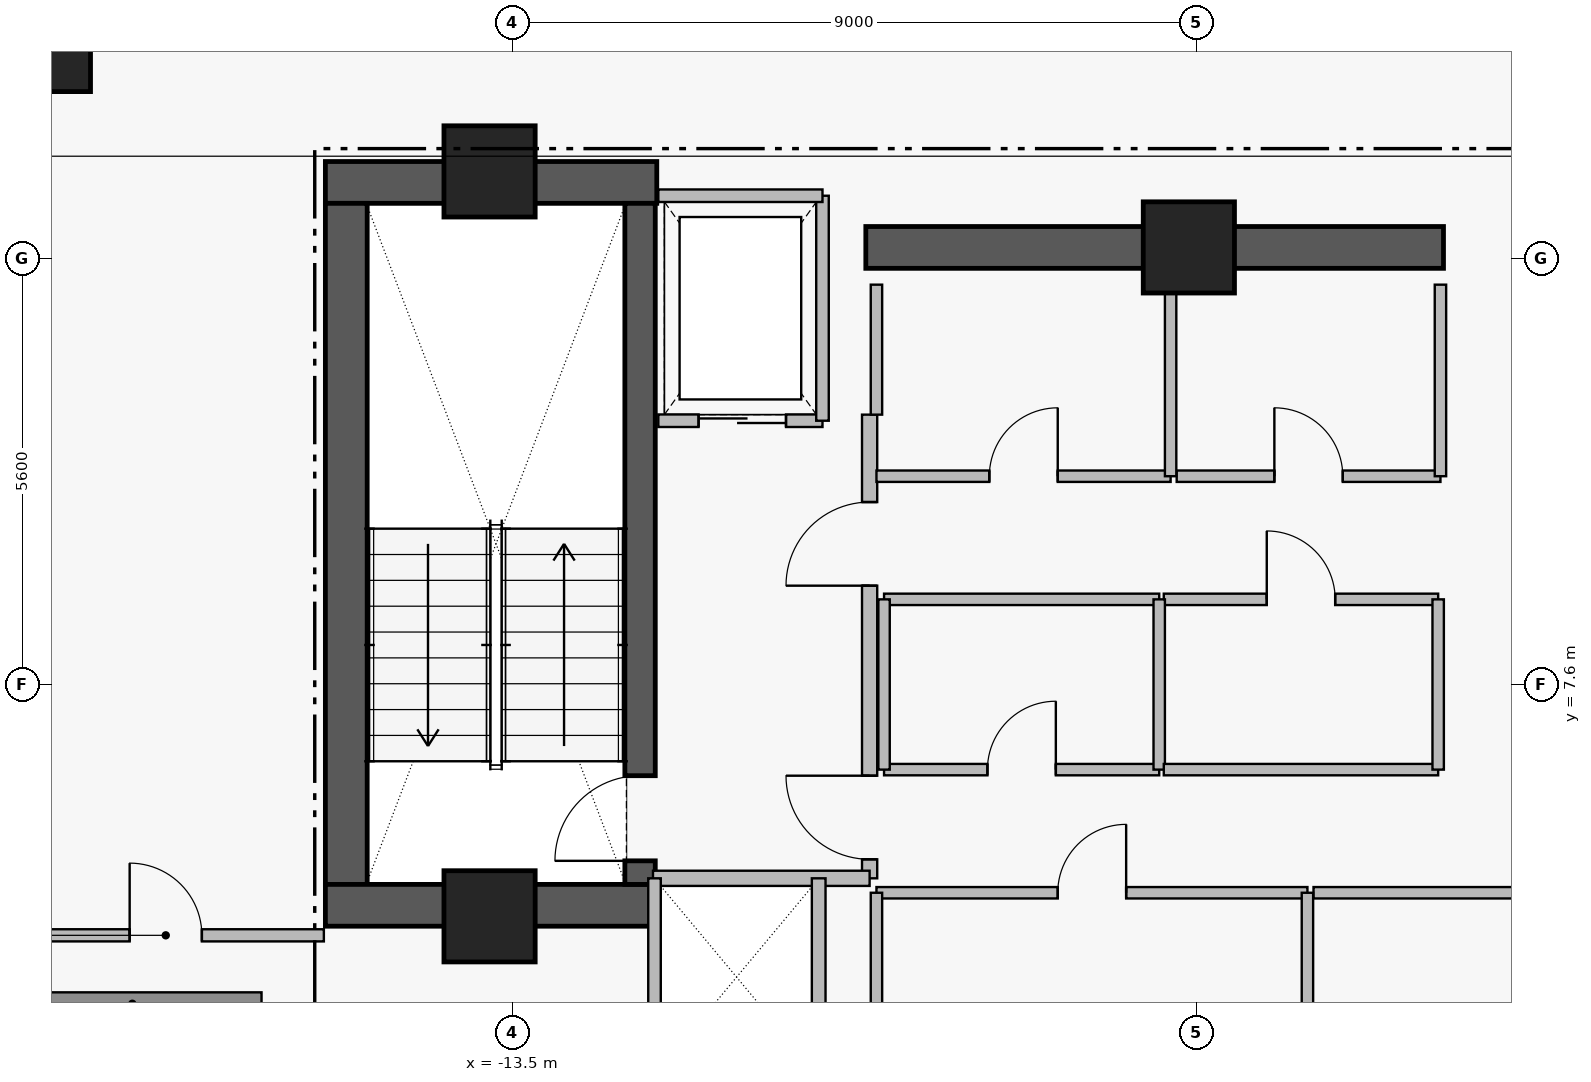
"""IFC4 building model, lengths in metres.
Left out: names, types, materials, properties, quantities, classifications, styles, units other than length and angle.
Written with IfcOpenShell. Run it as: python <this file> out.ifc"""

import sys

from ifc_helpers import new_model, si_unit, direction, frame, frame_2d, origin, origin_2d, place, context, subcontext, project, spatial, rectangle, extrude, element, fill, save


model = new_model("IFC4")
c1 = context("Model", 3, precision=1e-05, world=origin(), true_north=direction((0.0, 1.0)))
c2 = subcontext(c1, "Body", "Model", "MODEL_VIEW")
j1 = project(units=[si_unit("LENGTHUNIT", "METRE"), si_unit("PLANEANGLEUNIT", "RADIAN")], contexts=[c1])
p1 = place(None, origin())
s1 = spatial("IfcSite", under=j1, at=p1, CompositionType="ELEMENT")
p2 = place(p1, origin())
s2 = spatial("IfcBuilding", under=s1, at=p2, CompositionType="ELEMENT")
p3 = place(p2, frame((0.0, 0.0, 250.75)))
s3 = spatial("IfcBuildingStorey", under=s2, at=p3, CompositionType="ELEMENT", Elevation=250.75)
p4 = place(p3, frame((-15.96, 14.205, 0.0), z_axis=(0.0, 0.0, 1.0), x_axis=(1.0, 0.0, 0.0)))
e1 = element("IfcWall", 1, at=p4, inside=s3, PredefinedType="SHEAR", context=c2, shape_type="SweptSolid", body=[
    extrude(rectangle(XDim=4.36, YDim=0.55, at=frame_2d((2.18, 0.0))), origin(), (0.0, 0.0, 1.0), 3.51),
])
p5 = place(p3, frame((-15.685, 4.97, 0.0), z_axis=(0.0, 0.0, 1.0), x_axis=(0.0, 1.0, 0.0)))
e2 = element("IfcWall", 2, at=p5, inside=s3, PredefinedType="SHEAR", context=c2, shape_type="SweptSolid", body=[
    extrude(rectangle(XDim=8.96, YDim=0.55, at=frame_2d((4.48, 0.0))), origin(), (0.0, 0.0, 1.0), 3.51),
])
p6 = place(p3, frame((-15.96, 4.695, 0.0), z_axis=(0.0, 0.0, 1.0), x_axis=(1.0, 0.0, 0.0)))
e3 = element("IfcWall", 3, at=p6, inside=s3, PredefinedType="SHEAR", context=c2, shape_type="SweptSolid", body=[
    extrude(rectangle(XDim=4.36, YDim=0.55, at=frame_2d((2.18, 0.0))), origin(), (0.0, 0.0, 1.0), 3.51),
])
p7 = place(p3, frame((-8.85, 13.35, 0.0), z_axis=(0.0, 0.0, 1.0), x_axis=(1.0, 0.0, 0.0)))
e4 = element("IfcWall", 4, at=p7, inside=s3, PredefinedType="SHEAR", context=c2, shape_type="SweptSolid", body=[
    extrude(rectangle(XDim=7.6, YDim=0.55, at=frame_2d((3.8, 0.0))), origin(), (0.0, 0.0, 1.0), 3.48),
])
p8 = place(p3, frame((-11.82, 4.97, 0.0), z_axis=(0.0, 0.0, 1.0), x_axis=(0.0, 1.0, 0.0)))
e5 = element("IfcWall", 5, at=p8, inside=s3, PredefinedType="SHEAR", context=c2, shape_type="SweptSolid", body=[
    extrude(rectangle(XDim=8.96, YDim=0.4, at=frame_2d((4.48, 0.0))), origin(), (0.0, 0.0, 1.0), 3.51),
])
p9 = place(p8, frame((0.31, 0.0, 0.0)))
e6 = element("IfcOpeningElement", 6, at=p9, cuts=e5, PredefinedType="OPENING", context=c2, shape_type="SweptSolid", body=[
    extrude(rectangle(XDim=1.12, YDim=2.22, at=frame_2d((0.56, 1.11))), frame((0.0, 0.21, 0.0), z_axis=(0.0, -1.0, 0.0), x_axis=(1.0, 0.0, 0.0)), (0.0, 0.0, 1.0), 0.42),
])
for number, where, z_axis, x_axis in (
    (7, (-13.8, 14.35, 0.0), (0.0, 0.0, 1.0), (1.0, 0.0, 0.0)),
    (8, (-4.6, 13.35, 0.0), (0.0, 0.0, 1.0), (1.0, 0.0, 0.0)),
    (9, (-13.8, 4.55, 0.0), (0.0, 0.0, 1.0), (1.0, 0.0, 0.0)),
):
    element("IfcColumn", number, at=place(p3, frame(where, z_axis=z_axis, x_axis=x_axis)), inside=s3, PredefinedType="COLUMN", context=c2, shape_type="SweptSolid", body=[
        extrude(rectangle(XDim=1.2, YDim=1.2, at=origin_2d()), origin(), (0.0, 0.0, 1.0), 3.7),
    ])
p10 = place(p3, frame((-19.55, 15.9, 0.0), z_axis=(0.0, 0.0, 1.0), x_axis=(1.0, 0.0, 0.0)))
e10 = element("IfcColumn", 10, at=p10, inside=s3, PredefinedType="COLUMN", context=c2, shape_type="SweptSolid", body=[
    extrude(rectangle(XDim=1.0, YDim=1.0, at=origin_2d()), origin(), (0.0, 0.0, 1.0), 3.7),
])
p11 = place(p3, frame((-16.8, 3.4, 0.0), z_axis=(0.0, 0.0, 1.0), x_axis=(-1.0, 0.0, 0.0)))
e11 = element("IfcWall", 11, at=p11, inside=s3, PredefinedType="STANDARD", context=c2, shape_type="SweptSolid", body=[
    extrude(rectangle(XDim=3.4, YDim=0.3, at=frame_2d((1.7, 0.0))), origin(), (0.0, 0.0, 1.0), 3.48),
])
p12 = place(p3, frame((-8.8, 5.05, 0.0), z_axis=(0.0, 0.0, 1.0), x_axis=(0.0, 1.0, 0.0)))
e12 = element("IfcWall", 12, at=p12, inside=s3, PredefinedType="PARTITIONING", context=c2, shape_type="SweptSolid", body=[
    extrude(rectangle(XDim=6.1, YDim=0.2, at=frame_2d((3.05, 0.0))), origin(), (0.0, 0.0, 1.0), 3.48),
])
p13 = place(p12, frame((0.25, 0.0, 0.0)))
e13 = element("IfcOpeningElement", 13, at=p13, cuts=e12, PredefinedType="OPENING", context=c2, shape_type="SweptSolid", body=[
    extrude(rectangle(XDim=1.1, YDim=2.2, at=frame_2d((0.55, 1.1))), frame((0.0, 0.11, 0.0), z_axis=(0.0, -1.0, 0.0), x_axis=(1.0, 0.0, 0.0)), (0.0, 0.0, 1.0), 0.22),
])
p14 = place(p12, frame((3.85, 0.0, 0.0)))
e14 = element("IfcOpeningElement", 14, at=p14, cuts=e12, PredefinedType="OPENING", context=c2, shape_type="SweptSolid", body=[
    extrude(rectangle(XDim=1.1, YDim=2.2, at=frame_2d((0.55, 1.1))), frame((0.0, 0.11, 0.0), z_axis=(0.0, -1.0, 0.0), x_axis=(1.0, 0.0, 0.0)), (0.0, 0.0, 1.0), 0.22),
])
p15 = place(p3, frame((-11.58, 11.07, 0.0), z_axis=(0.0, 0.0, 1.0), x_axis=(1.0, 0.0, 0.0)))
e15 = element("IfcWall", 15, at=p15, inside=s3, PredefinedType="PARTITIONING", context=c2, shape_type="SweptSolid", body=[
    extrude(rectangle(XDim=2.16, YDim=0.165, at=frame_2d((1.08, 0.0))), origin(), (0.0, 0.0, 1.0), 3.48),
])
p16 = place(p15, frame((0.53, 0.0, 0.0)))
e16 = element("IfcOpeningElement", 16, at=p16, cuts=e15, PredefinedType="OPENING", context=c2, shape_type="SweptSolid", body=[
    extrude(rectangle(XDim=1.15, YDim=2.25, at=frame_2d((0.575, 1.125))), frame((0.0, 0.093, 0.0), z_axis=(0.0, -1.0, 0.0), x_axis=(1.0, 0.0, 0.0)), (0.0, 0.0, 1.0), 0.185),
])
p17 = place(p3, frame((-8.71, 4.86, 0.0), z_axis=(0.0, 0.0, 1.0), x_axis=(1.0, 0.0, 0.0)))
e17 = element("IfcWall", 17, at=p17, inside=s3, PredefinedType="PARTITIONING", context=c2, shape_type="SweptSolid", body=[
    extrude(rectangle(XDim=5.67, YDim=0.15, at=frame_2d((2.835, 0.0))), origin(), (0.0, 0.0, 1.0), 3.48),
])
p18 = place(p17, frame((2.385, 0.0, 0.0)))
e18 = element("IfcOpeningElement", 18, at=p18, cuts=e17, PredefinedType="OPENING", context=c2, shape_type="SweptSolid", body=[
    extrude(rectangle(XDim=0.9, YDim=2.15, at=frame_2d((0.45, 1.075))), frame((0.0, 0.085, 0.0), z_axis=(0.0, -1.0, 0.0), x_axis=(1.0, 0.0, 0.0)), (0.0, 0.0, 1.0), 0.17),
])
p19 = place(p3, frame((-2.96, 4.86, 0.0), z_axis=(0.0, 0.0, 1.0), x_axis=(1.0, 0.0, 0.0)))
e19 = element("IfcWall", 19, at=p19, inside=s3, PredefinedType="PARTITIONING", context=c2, shape_type="SweptSolid", body=[
    extrude(rectangle(XDim=6.67, YDim=0.15, at=frame_2d((3.335, 0.0))), origin(), (0.0, 0.0, 1.0), 3.48),
])
p20 = place(p19, frame((2.885, 0.0, 0.0)))
e20 = element("IfcOpeningElement", 20, at=p20, cuts=e19, PredefinedType="OPENING", context=c2, shape_type="SweptSolid", body=[
    extrude(rectangle(XDim=0.9, YDim=2.15, at=frame_2d((0.45, 1.075))), frame((0.0, 0.085, 0.0), z_axis=(0.0, -1.0, 0.0), x_axis=(1.0, 0.0, 0.0)), (0.0, 0.0, 1.0), 0.17),
])
p21 = place(p3, frame((-8.71, 10.34, 0.0), z_axis=(0.0, 0.0, 1.0), x_axis=(1.0, 0.0, 0.0)))
e21 = element("IfcWall", 21, at=p21, inside=s3, PredefinedType="PARTITIONING", context=c2, shape_type="SweptSolid", body=[
    extrude(rectangle(XDim=3.87, YDim=0.15, at=frame_2d((1.935, 0.0))), origin(), (0.0, 0.0, 1.0), 3.48),
])
p22 = place(p21, frame((1.485, 0.0, 0.0)))
e22 = element("IfcOpeningElement", 22, at=p22, cuts=e21, PredefinedType="OPENING", context=c2, shape_type="SweptSolid", body=[
    extrude(rectangle(XDim=0.9, YDim=2.15, at=frame_2d((0.45, 1.075))), frame((0.0, 0.085, 0.0), z_axis=(0.0, -1.0, 0.0), x_axis=(1.0, 0.0, 0.0)), (0.0, 0.0, 1.0), 0.17),
])
p23 = place(p3, frame((-4.76, 10.34, 0.0), z_axis=(0.0, 0.0, 1.0), x_axis=(1.0, 0.0, 0.0)))
e23 = element("IfcWall", 23, at=p23, inside=s3, PredefinedType="PARTITIONING", context=c2, shape_type="SweptSolid", body=[
    extrude(rectangle(XDim=3.47, YDim=0.15, at=frame_2d((1.735, 0.0))), origin(), (0.0, 0.0, 1.0), 3.48),
])
p24 = place(p23, frame((1.285, 0.0, 0.0)))
e24 = element("IfcOpeningElement", 24, at=p24, cuts=e23, PredefinedType="OPENING", context=c2, shape_type="SweptSolid", body=[
    extrude(rectangle(XDim=0.9, YDim=2.15, at=frame_2d((0.45, 1.075))), frame((0.0, 0.085, 0.0), z_axis=(0.0, -1.0, 0.0), x_axis=(1.0, 0.0, 0.0)), (0.0, 0.0, 1.0), 0.17),
])
p25 = place(p3, frame((-8.61, 6.48, 0.0), z_axis=(0.0, 0.0, 1.0), x_axis=(1.0, 0.0, 0.0)))
e25 = element("IfcWall", 25, at=p25, inside=s3, PredefinedType="PARTITIONING", context=c2, shape_type="SweptSolid", body=[
    extrude(rectangle(XDim=3.62, YDim=0.15, at=frame_2d((1.81, 0.0))), origin(), (0.0, 0.0, 1.0), 3.48),
])
p26 = place(p25, frame((1.36, 0.0, 0.0)))
e26 = element("IfcOpeningElement", 26, at=p26, cuts=e25, PredefinedType="OPENING", context=c2, shape_type="SweptSolid", body=[
    extrude(rectangle(XDim=0.9, YDim=2.15, at=frame_2d((0.45, 1.075))), frame((0.0, 0.085, 0.0), z_axis=(0.0, -1.0, 0.0), x_axis=(1.0, 0.0, 0.0)), (0.0, 0.0, 1.0), 0.17),
])
p27 = place(p3, frame((-4.93, 8.72, 0.0), z_axis=(0.0, 0.0, 1.0), x_axis=(1.0, 0.0, 0.0)))
e27 = element("IfcWall", 27, at=p27, inside=s3, PredefinedType="PARTITIONING", context=c2, shape_type="SweptSolid", body=[
    extrude(rectangle(XDim=3.61, YDim=0.15, at=frame_2d((1.805, 0.0))), origin(), (0.0, 0.0, 1.0), 3.48),
])
p28 = place(p27, frame((1.355, 0.0, 0.0)))
e28 = element("IfcOpeningElement", 28, at=p28, cuts=e27, PredefinedType="OPENING", context=c2, shape_type="SweptSolid", body=[
    extrude(rectangle(XDim=0.9, YDim=2.15, at=frame_2d((0.45, 1.075))), frame((0.0, 0.085, 0.0), z_axis=(0.0, -1.0, 0.0), x_axis=(1.0, 0.0, 0.0)), (0.0, 0.0, 1.0), 0.17),
])
p29 = place(p3, frame((-20.14, 4.3, 0.0), z_axis=(0.0, 0.0, 1.0), x_axis=(1.0, 0.0, 0.0)))
e29 = element("IfcWall", 29, at=p29, inside=s3, PredefinedType="PARTITIONING", context=c2, shape_type="SweptSolid", body=[
    extrude(rectangle(XDim=4.16, YDim=0.16, at=frame_2d((2.08, 0.0))), origin(), (0.0, 0.0, 1.0), 3.48),
])
p30 = place(p29, frame((1.605, 0.0, 0.0)))
e30 = element("IfcOpeningElement", 30, at=p30, cuts=e29, PredefinedType="OPENING", context=c2, shape_type="SweptSolid", body=[
    extrude(rectangle(XDim=0.95, YDim=2.15, at=frame_2d((0.475, 1.075))), frame((0.0, 0.09, 0.0), z_axis=(0.0, -1.0, 0.0), x_axis=(1.0, 0.0, 0.0)), (0.0, 0.0, 1.0), 0.18),
])
p31 = place(p3, frame((-11.65, 5.05, 0.0), z_axis=(0.0, 0.0, 1.0), x_axis=(1.0, 0.0, 0.0)))
e31 = element("IfcWall", 31, at=p31, inside=s3, PredefinedType="PARTITIONING", context=c2, shape_type="SweptSolid", body=[
    extrude(rectangle(XDim=2.85, YDim=0.2, at=frame_2d((1.425, 0.0))), origin(), (0.0, 0.0, 1.0), 3.48),
])
p32 = place(p3, frame((-9.42, 11.07, 0.0), z_axis=(0.0, 0.0, 1.0), x_axis=(0.0, 1.0, 0.0)))
e32 = element("IfcWall", 32, at=p32, inside=s3, PredefinedType="PARTITIONING", context=c2, shape_type="SweptSolid", body=[
    extrude(rectangle(XDim=2.96, YDim=0.165, at=frame_2d((1.48, 0.0))), origin(), (0.0, 0.0, 1.0), 3.48),
])
p33 = place(p3, frame((-11.58, 14.03, 0.0), z_axis=(0.0, 0.0, 1.0), x_axis=(1.0, 0.0, 0.0)))
e33 = element("IfcWall", 33, at=p33, inside=s3, PredefinedType="PARTITIONING", context=c2, shape_type="SweptSolid", body=[
    extrude(rectangle(XDim=2.16, YDim=0.165, at=frame_2d((1.08, 0.0))), origin(), (0.0, 0.0, 1.0), 3.48),
])
for number, where, z_axis, x_axis in (
    (34, (-8.71, 2.49, 0.0), (0.0, 0.0, 1.0), (0.0, 1.0, 0.0)),
    (35, (-3.04, 2.49, 0.0), (0.0, 0.0, 1.0), (0.0, 1.0, 0.0)),
):
    element("IfcWall", number, at=place(p3, frame(where, z_axis=z_axis, x_axis=x_axis)), inside=s3, PredefinedType="PARTITIONING", context=c2, shape_type="SweptSolid", body=[
        extrude(rectangle(XDim=2.37, YDim=0.15, at=frame_2d((1.185, 0.0))), origin(), (0.0, 0.0, 1.0), 3.48),
    ])
p34 = place(p3, frame((-8.71, 11.15, 0.0), z_axis=(0.0, 0.0, 1.0), x_axis=(0.0, 1.0, 0.0)))
e36 = element("IfcWall", 36, at=p34, inside=s3, PredefinedType="PARTITIONING", context=c2, shape_type="SweptSolid", body=[
    extrude(rectangle(XDim=1.71, YDim=0.15, at=frame_2d((0.855, 0.0))), origin(), (0.0, 0.0, 1.0), 3.48),
])
for number, where, z_axis, x_axis in (
    (37, (-4.84, 10.34, 0.0), (0.0, 0.0, 1.0), (0.0, 1.0, 0.0)),
    (38, (-1.29, 10.34, 0.0), (0.0, 0.0, 1.0), (0.0, 1.0, 0.0)),
):
    element("IfcWall", number, at=place(p3, frame(where, z_axis=z_axis, x_axis=x_axis)), inside=s3, PredefinedType="PARTITIONING", context=c2, shape_type="SweptSolid", body=[
        extrude(rectangle(XDim=2.52, YDim=0.15, at=frame_2d((1.26, 0.0))), origin(), (0.0, 0.0, 1.0), 3.48),
    ])
p35 = place(p3, frame((-9.47, 2.45, 0.0), z_axis=(0.0, 0.0, 1.0), x_axis=(0.0, 1.0, 0.0)))
e39 = element("IfcWall", 39, at=p35, inside=s3, PredefinedType="PARTITIONING", context=c2, shape_type="SweptSolid", body=[
    extrude(rectangle(XDim=2.6, YDim=0.18, at=frame_2d((1.3, 0.0))), origin(), (0.0, 0.0, 1.0), 3.48),
])
p36 = place(p3, frame((-11.63, 2.47, 0.0), z_axis=(0.0, 0.0, 1.0), x_axis=(0.0, 1.0, 0.0)))
e40 = element("IfcWall", 40, at=p36, inside=s3, PredefinedType="PARTITIONING", context=c2, shape_type="SweptSolid", body=[
    extrude(rectangle(XDim=2.58, YDim=0.165, at=frame_2d((1.29, 0.0))), origin(), (0.0, 0.0, 1.0), 3.48),
])
p37 = place(p3, frame((-8.61, 8.72, 0.0), z_axis=(0.0, 0.0, 1.0), x_axis=(1.0, 0.0, 0.0)))
e41 = element("IfcWall", 41, at=p37, inside=s3, PredefinedType="PARTITIONING", context=c2, shape_type="SweptSolid", body=[
    extrude(rectangle(XDim=3.62, YDim=0.15, at=frame_2d((1.81, 0.0))), origin(), (0.0, 0.0, 1.0), 3.48),
])
for number, where, z_axis, x_axis in (
    (42, (-8.61, 6.48, 0.0), (0.0, 0.0, 1.0), (0.0, 1.0, 0.0)),
    (43, (-4.99, 6.48, 0.0), (0.0, 0.0, 1.0), (0.0, 1.0, 0.0)),
):
    element("IfcWall", number, at=place(p3, frame(where, z_axis=z_axis, x_axis=x_axis)), inside=s3, PredefinedType="PARTITIONING", context=c2, shape_type="SweptSolid", body=[
        extrude(rectangle(XDim=2.24, YDim=0.15, at=frame_2d((1.12, 0.0))), origin(), (0.0, 0.0, 1.0), 3.48),
    ])
p38 = place(p3, frame((-4.93, 6.48, 0.0), z_axis=(0.0, 0.0, 1.0), x_axis=(1.0, 0.0, 0.0)))
e44 = element("IfcWall", 44, at=p38, inside=s3, PredefinedType="PARTITIONING", context=c2, shape_type="SweptSolid", body=[
    extrude(rectangle(XDim=3.61, YDim=0.15, at=frame_2d((1.805, 0.0))), origin(), (0.0, 0.0, 1.0), 3.48),
])
p39 = place(p3, frame((-1.32, 6.48, 0.0), z_axis=(0.0, 0.0, 1.0), x_axis=(0.0, 1.0, 0.0)))
e45 = element("IfcWall", 45, at=p39, inside=s3, PredefinedType="PARTITIONING", context=c2, shape_type="SweptSolid", body=[
    extrude(rectangle(XDim=2.24, YDim=0.15, at=frame_2d((1.12, 0.0))), origin(), (0.0, 0.0, 1.0), 3.48),
])
p40 = place(p9, origin())
e46 = element("IfcDoor", 46, at=p40, inside=s3, OperationType="SINGLE_SWING_LEFT", PredefinedType="DOOR", context=c2, shape_type="SweptSolid", body=[
    extrude(rectangle(XDim=1.12, YDim=2.22, at=frame_2d((0.56, 1.11))), frame((0.0, 0.025, 0.0), z_axis=(0.0, -1.0, 0.0), x_axis=(1.0, 0.0, 0.0)), (0.0, 0.0, 1.0), 0.05),
])
fill(e6, e46)
p41 = place(p13, origin())
e47 = element("IfcDoor", 47, at=p41, inside=s3, OperationType="SINGLE_SWING_RIGHT", PredefinedType="DOOR", context=c2, shape_type="SweptSolid", body=[
    extrude(rectangle(XDim=1.1, YDim=2.2, at=frame_2d((0.55, 1.1))), frame((0.0, 0.025, 0.0), z_axis=(0.0, -1.0, 0.0), x_axis=(1.0, 0.0, 0.0)), (0.0, 0.0, 1.0), 0.05),
])
fill(e13, e47)
p42 = place(p14, origin())
e48 = element("IfcDoor", 48, at=p42, inside=s3, OperationType="SINGLE_SWING_LEFT", PredefinedType="DOOR", context=c2, shape_type="SweptSolid", body=[
    extrude(rectangle(XDim=1.1, YDim=2.2, at=frame_2d((0.55, 1.1))), frame((0.0, 0.025, 0.0), z_axis=(0.0, -1.0, 0.0), x_axis=(1.0, 0.0, 0.0)), (0.0, 0.0, 1.0), 0.05),
])
fill(e14, e48)
p43 = place(p16, origin())
e49 = element("IfcDoor", 49, at=p43, inside=s3, OperationType="SLIDING_TO_LEFT", PredefinedType="DOOR", context=c2, shape_type="SweptSolid", body=[
    extrude(rectangle(XDim=1.15, YDim=2.25, at=frame_2d((0.575, 1.125))), frame((0.0, 0.025, 0.0), z_axis=(0.0, -1.0, 0.0), x_axis=(1.0, 0.0, 0.0)), (0.0, 0.0, 1.0), 0.05),
])
fill(e16, e49)
p44 = place(p18, origin())
e50 = element("IfcDoor", 50, at=p44, inside=s3, OperationType="SINGLE_SWING_RIGHT", PredefinedType="DOOR", context=c2, shape_type="SweptSolid", body=[
    extrude(rectangle(XDim=0.9, YDim=2.15, at=frame_2d((0.45, 1.075))), frame((0.0, 0.025, 0.0), z_axis=(0.0, -1.0, 0.0), x_axis=(1.0, 0.0, 0.0)), (0.0, 0.0, 1.0), 0.05),
])
fill(e18, e50)
p45 = place(p22, origin())
e51 = element("IfcDoor", 51, at=p45, inside=s3, OperationType="SINGLE_SWING_RIGHT", PredefinedType="DOOR", context=c2, shape_type="SweptSolid", body=[
    extrude(rectangle(XDim=0.9, YDim=2.15, at=frame_2d((0.45, 1.075))), frame((0.0, 0.025, 0.0), z_axis=(0.0, -1.0, 0.0), x_axis=(1.0, 0.0, 0.0)), (0.0, 0.0, 1.0), 0.05),
])
fill(e22, e51)
p46 = place(p24, origin())
e52 = element("IfcDoor", 52, at=p46, inside=s3, OperationType="SINGLE_SWING_LEFT", PredefinedType="DOOR", context=c2, shape_type="SweptSolid", body=[
    extrude(rectangle(XDim=0.9, YDim=2.15, at=frame_2d((0.45, 1.075))), frame((0.0, 0.025, 0.0), z_axis=(0.0, -1.0, 0.0), x_axis=(1.0, 0.0, 0.0)), (0.0, 0.0, 1.0), 0.05),
])
fill(e24, e52)
p47 = place(p26, origin())
e53 = element("IfcDoor", 53, at=p47, inside=s3, OperationType="SINGLE_SWING_RIGHT", PredefinedType="DOOR", context=c2, shape_type="SweptSolid", body=[
    extrude(rectangle(XDim=0.9, YDim=2.15, at=frame_2d((0.45, 1.075))), frame((0.0, 0.025, 0.0), z_axis=(0.0, -1.0, 0.0), x_axis=(1.0, 0.0, 0.0)), (0.0, 0.0, 1.0), 0.05),
])
fill(e26, e53)
p48 = place(p28, origin())
e54 = element("IfcDoor", 54, at=p48, inside=s3, OperationType="SINGLE_SWING_LEFT", PredefinedType="DOOR", context=c2, shape_type="SweptSolid", body=[
    extrude(rectangle(XDim=0.9, YDim=2.15, at=frame_2d((0.45, 1.075))), frame((0.0, 0.025, 0.0), z_axis=(0.0, -1.0, 0.0), x_axis=(1.0, 0.0, 0.0)), (0.0, 0.0, 1.0), 0.05),
])
fill(e28, e54)
p49 = place(p30, origin())
e55 = element("IfcDoor", 55, at=p49, inside=s3, OperationType="SINGLE_SWING_LEFT", PredefinedType="DOOR", context=c2, shape_type="SweptSolid", body=[
    extrude(rectangle(XDim=0.95, YDim=2.15, at=frame_2d((0.475, 1.075))), frame((0.0, 0.025, 0.0), z_axis=(0.0, -1.0, 0.0), x_axis=(1.0, 0.0, 0.0)), (0.0, 0.0, 1.0), 0.05),
])
fill(e30, e55)
save(model, sys.argv[1])
